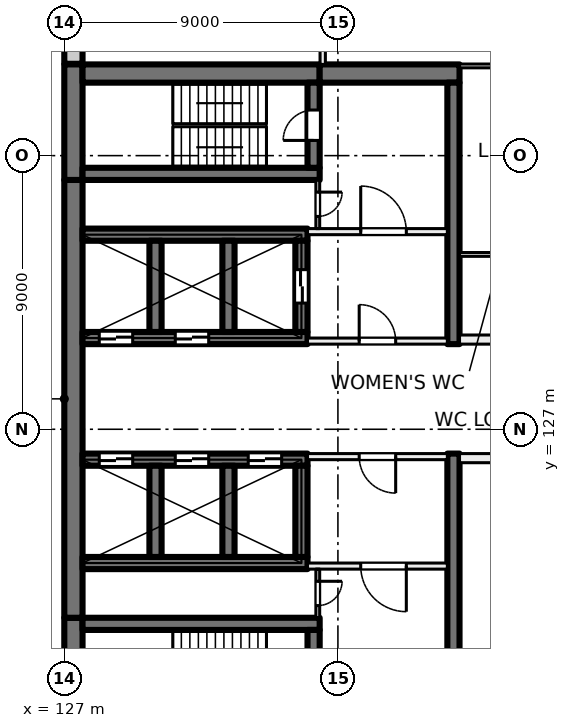
"""IFC4 building model, lengths in metres.
Left out: names, types, materials, properties, quantities, classifications, styles, units other than length and angle.
Written with IfcOpenShell. Run it as: python <this file> out.ifc"""

import sys

from ifc_helpers import new_model, si_unit, direction, frame, frame_2d, origin, place, context, subcontext, project, spatial, rectangle, extrude, element, fill, save


model = new_model("IFC4")
c1 = context("Model", 3, precision=1e-05, world=origin(), true_north=direction((0.0, 1.0)))
c2 = subcontext(c1, "Body", "Model", "MODEL_VIEW")
j1 = project(units=[si_unit("LENGTHUNIT", "METRE"), si_unit("PLANEANGLEUNIT", "RADIAN")], contexts=[c1])
p1 = place(None, origin())
s1 = spatial("IfcSite", under=j1, at=p1, CompositionType="ELEMENT")
p2 = place(p1, origin())
s2 = spatial("IfcBuilding", under=s1, at=p2, CompositionType="ELEMENT")
p3 = place(p2, frame((0.0, 0.0, 59.5)))
s3 = spatial("IfcBuildingStorey", under=s2, at=p3, CompositionType="ELEMENT", Elevation=59.5)
p4 = place(p3, frame((127.3, 117.0, 0.0), z_axis=(0.0, 0.0, 1.0), x_axis=(0.0, 1.0, 0.0)))
e1 = element("IfcWall", 1, at=p4, inside=s3, PredefinedType="SHEAR", context=c2, shape_type="SweptSolid", body=[
    extrude(rectangle(XDim=3.8, YDim=0.6, at=frame_2d((1.9, 0.0))), origin(), (0.0, 0.0, 1.0), 4.0),
])
p5 = place(p3, frame((127.3, 120.8, 0.0), z_axis=(0.0, 0.0, 1.0), x_axis=(0.0, 1.0, 0.0)))
e2 = element("IfcWall", 2, at=p5, inside=s3, PredefinedType="SHEAR", context=c2, shape_type="SweptSolid", body=[
    extrude(rectangle(XDim=14.4, YDim=0.6, at=frame_2d((7.2, 0.0))), origin(), (0.0, 0.0, 1.0), 4.0),
])
p6 = place(p3, frame((127.3, 135.2, 0.0), z_axis=(0.0, 0.0, 1.0), x_axis=(0.0, 1.0, 0.0)))
e3 = element("IfcWall", 3, at=p6, inside=s3, PredefinedType="SHEAR", context=c2, shape_type="SweptSolid", body=[
    extrude(rectangle(XDim=3.8, YDim=0.6, at=frame_2d((1.9, 0.0))), origin(), (0.0, 0.0, 1.0), 4.0),
])
p7 = place(p3, frame((127.6, 138.7, 0.0), z_axis=(0.0, 0.0, 1.0), x_axis=(1.0, 0.0, 0.0)))
e4 = element("IfcWall", 4, at=p7, inside=s3, PredefinedType="SHEAR", context=c2, shape_type="SweptSolid", body=[
    extrude(rectangle(XDim=7.8, YDim=0.6, at=frame_2d((3.9, 0.0))), origin(), (0.0, 0.0, 1.0), 4.0),
])
p8 = place(p3, frame((135.4, 138.7, 0.0), z_axis=(0.0, 0.0, 1.0), x_axis=(1.0, 0.0, 0.0)))
e5 = element("IfcWall", 5, at=p8, inside=s3, PredefinedType="SHEAR", context=c2, shape_type="SweptSolid", body=[
    extrude(rectangle(XDim=4.6, YDim=0.6, at=frame_2d((2.3, 0.0))), origin(), (0.0, 0.0, 1.0), 4.0),
])
p9 = place(p3, frame((127.6, 120.6, 0.0), z_axis=(0.0, 0.0, 1.0), x_axis=(1.0, 0.0, 0.0)))
e6 = element("IfcWall", 6, at=p9, inside=s3, PredefinedType="SHEAR", context=c2, shape_type="SweptSolid", body=[
    extrude(rectangle(XDim=7.8, YDim=0.4, at=frame_2d((3.9, 0.0))), origin(), (0.0, 0.0, 1.0), 4.0),
])
p10 = place(p3, frame((135.2, 117.6, 0.0), z_axis=(0.0, 0.0, 1.0), x_axis=(0.0, 1.0, 0.0)))
e7 = element("IfcWall", 7, at=p10, inside=s3, PredefinedType="SHEAR", context=c2, shape_type="SweptSolid", body=[
    extrude(rectangle(XDim=2.8, YDim=0.4, at=frame_2d((1.4, 0.0))), origin(), (0.0, 0.0, 1.0), 4.0),
])
p11 = place(p10, frame((0.9, 0.0, 0.0)))
e8 = element("IfcOpeningElement", 8, at=p11, cuts=e7, PredefinedType="OPENING", context=c2, shape_type="SweptSolid", body=[
    extrude(rectangle(XDim=1.0, YDim=2.1, at=frame_2d((0.5, 1.05))), frame((0.0, 0.21, 0.0), z_axis=(0.0, -1.0, 0.0), x_axis=(1.0, 0.0, 0.0)), (0.0, 0.0, 1.0), 0.42),
])
p12 = place(p3, frame((127.6, 135.4, 0.0), z_axis=(0.0, 0.0, 1.0), x_axis=(1.0, 0.0, 0.0)))
e9 = element("IfcWall", 9, at=p12, inside=s3, PredefinedType="SHEAR", context=c2, shape_type="SweptSolid", body=[
    extrude(rectangle(XDim=7.8, YDim=0.4, at=frame_2d((3.9, 0.0))), origin(), (0.0, 0.0, 1.0), 4.0),
])
p13 = place(p3, frame((135.2, 135.6, 0.0), z_axis=(0.0, 0.0, 1.0), x_axis=(0.0, 1.0, 0.0)))
e10 = element("IfcWall", 10, at=p13, inside=s3, PredefinedType="SHEAR", context=c2, shape_type="SweptSolid", body=[
    extrude(rectangle(XDim=2.8, YDim=0.4, at=frame_2d((1.4, 0.0))), origin(), (0.0, 0.0, 1.0), 4.0),
])
p14 = place(p13, frame((0.9, 0.0, 0.0)))
e11 = element("IfcOpeningElement", 11, at=p14, cuts=e10, PredefinedType="OPENING", context=c2, shape_type="SweptSolid", body=[
    extrude(rectangle(XDim=1.0, YDim=2.1, at=frame_2d((0.5, 1.05))), frame((0.0, 0.21, 0.0), z_axis=(0.0, -1.0, 0.0), x_axis=(1.0, 0.0, 0.0)), (0.0, 0.0, 1.0), 0.42),
])
p15 = place(p3, frame((127.6, 126.0, 0.0), z_axis=(0.0, 0.0, 1.0), x_axis=(1.0, 0.0, 0.0)))
e12 = element("IfcWall", 12, at=p15, inside=s3, PredefinedType="SHEAR", context=c2, shape_type="SweptSolid", body=[
    extrude(rectangle(XDim=7.4, YDim=0.4, at=frame_2d((3.7, 0.0))), origin(), (0.0, 0.0, 1.0), 4.0),
])
p16 = place(p15, frame((0.55, 0.0, 0.0)))
e13 = element("IfcOpeningElement", 13, at=p16, cuts=e12, PredefinedType="OPENING", context=c2, shape_type="SweptSolid", body=[
    extrude(rectangle(XDim=1.1, YDim=2.1, at=frame_2d((0.55, 1.05))), frame((0.0, 0.21, 0.0), z_axis=(0.0, -1.0, 0.0), x_axis=(1.0, 0.0, 0.0)), (0.0, 0.0, 1.0), 0.42),
])
p17 = place(p15, frame((3.05, 0.0, 0.0)))
e14 = element("IfcOpeningElement", 14, at=p17, cuts=e12, PredefinedType="OPENING", context=c2, shape_type="SweptSolid", body=[
    extrude(rectangle(XDim=1.1, YDim=2.1, at=frame_2d((0.55, 1.05))), frame((0.0, 0.21, 0.0), z_axis=(0.0, -1.0, 0.0), x_axis=(1.0, 0.0, 0.0)), (0.0, 0.0, 1.0), 0.42),
])
p18 = place(p15, frame((5.45, 0.0, 0.0)))
e15 = element("IfcOpeningElement", 15, at=p18, cuts=e12, PredefinedType="OPENING", context=c2, shape_type="SweptSolid", body=[
    extrude(rectangle(XDim=1.1, YDim=2.1, at=frame_2d((0.55, 1.05))), frame((0.0, 0.21, 0.0), z_axis=(0.0, -1.0, 0.0), x_axis=(1.0, 0.0, 0.0)), (0.0, 0.0, 1.0), 0.42),
])
p19 = place(p3, frame((127.6, 122.6, 0.0), z_axis=(0.0, 0.0, 1.0), x_axis=(1.0, 0.0, 0.0)))
e16 = element("IfcWall", 16, at=p19, inside=s3, PredefinedType="SHEAR", context=c2, shape_type="SweptSolid", body=[
    extrude(rectangle(XDim=7.4, YDim=0.4, at=frame_2d((3.7, 0.0))), origin(), (0.0, 0.0, 1.0), 4.0),
])
for number, where, z_axis, x_axis in (
    (17, (130.0, 122.8, 0.0), (0.0, 0.0, 1.0), (0.0, 1.0, 0.0)),
    (18, (132.4, 122.8, 0.0), (0.0, 0.0, 1.0), (0.0, 1.0, 0.0)),
    (19, (134.8, 122.8, 0.0), (0.0, 0.0, 1.0), (0.0, 1.0, 0.0)),
):
    element("IfcWall", number, at=place(p3, frame(where, z_axis=z_axis, x_axis=x_axis)), inside=s3, PredefinedType="SHEAR", context=c2, shape_type="SweptSolid", body=[
        extrude(rectangle(XDim=3.0, YDim=0.4, at=frame_2d((1.5, 0.0))), origin(), (0.0, 0.0, 1.0), 4.0),
    ])
p20 = place(p3, frame((127.6, 130.0, 0.0), z_axis=(0.0, 0.0, 1.0), x_axis=(1.0, 0.0, 0.0)))
e20 = element("IfcWall", 20, at=p20, inside=s3, PredefinedType="SHEAR", context=c2, shape_type="SweptSolid", body=[
    extrude(rectangle(XDim=7.4, YDim=0.4, at=frame_2d((3.7, 0.0))), origin(), (0.0, 0.0, 1.0), 4.0),
])
p21 = place(p20, frame((0.55, 0.0, 0.0)))
e21 = element("IfcOpeningElement", 21, at=p21, cuts=e20, PredefinedType="OPENING", context=c2, shape_type="SweptSolid", body=[
    extrude(rectangle(XDim=1.1, YDim=2.1, at=frame_2d((0.55, 1.05))), frame((0.0, 0.21, 0.0), z_axis=(0.0, -1.0, 0.0), x_axis=(1.0, 0.0, 0.0)), (0.0, 0.0, 1.0), 0.42),
])
p22 = place(p20, frame((3.05, 0.0, 0.0)))
e22 = element("IfcOpeningElement", 22, at=p22, cuts=e20, PredefinedType="OPENING", context=c2, shape_type="SweptSolid", body=[
    extrude(rectangle(XDim=1.1, YDim=2.1, at=frame_2d((0.55, 1.05))), frame((0.0, 0.21, 0.0), z_axis=(0.0, -1.0, 0.0), x_axis=(1.0, 0.0, 0.0)), (0.0, 0.0, 1.0), 0.42),
])
p23 = place(p3, frame((127.6, 133.4, 0.0), z_axis=(0.0, 0.0, 1.0), x_axis=(1.0, 0.0, 0.0)))
e23 = element("IfcWall", 23, at=p23, inside=s3, PredefinedType="SHEAR", context=c2, shape_type="SweptSolid", body=[
    extrude(rectangle(XDim=7.4, YDim=0.4, at=frame_2d((3.7, 0.0))), origin(), (0.0, 0.0, 1.0), 4.0),
])
for number, where, z_axis, x_axis in (
    (24, (130.0, 130.2, 0.0), (0.0, 0.0, 1.0), (0.0, 1.0, 0.0)),
    (25, (132.4, 130.2, 0.0), (0.0, 0.0, 1.0), (0.0, 1.0, 0.0)),
):
    element("IfcWall", number, at=place(p3, frame(where, z_axis=z_axis, x_axis=x_axis)), inside=s3, PredefinedType="SHEAR", context=c2, shape_type="SweptSolid", body=[
        extrude(rectangle(XDim=3.0, YDim=0.4, at=frame_2d((1.5, 0.0))), origin(), (0.0, 0.0, 1.0), 4.0),
    ])
p24 = place(p3, frame((134.8, 130.2, 0.0), z_axis=(0.0, 0.0, 1.0), x_axis=(0.0, 1.0, 0.0)))
e26 = element("IfcWall", 26, at=p24, inside=s3, PredefinedType="SHEAR", context=c2, shape_type="SweptSolid", body=[
    extrude(rectangle(XDim=3.0, YDim=0.4, at=frame_2d((1.5, 0.0))), origin(), (0.0, 0.0, 1.0), 4.0),
])
p25 = place(p24, frame((0.95, 0.0, 0.0)))
e27 = element("IfcOpeningElement", 27, at=p25, cuts=e26, PredefinedType="OPENING", context=c2, shape_type="SweptSolid", body=[
    extrude(rectangle(XDim=1.1, YDim=2.1, at=frame_2d((0.55, 1.05))), frame((0.0, 0.21, 0.0), z_axis=(0.0, -1.0, 0.0), x_axis=(1.0, 0.0, 0.0)), (0.0, 0.0, 1.0), 0.42),
])
for number, where, z_axis, x_axis in (
    (28, (139.8, 117.6, 0.0), (0.0, 0.0, 1.0), (0.0, 1.0, 0.0)),
    (29, (139.8, 129.8, 0.0), (0.0, 0.0, 1.0), (0.0, 1.0, 0.0)),
):
    element("IfcWall", number, at=place(p3, frame(where, z_axis=z_axis, x_axis=x_axis)), inside=s3, PredefinedType="SHEAR", context=c2, shape_type="SweptSolid", body=[
        extrude(rectangle(XDim=8.6, YDim=0.4, at=frame_2d((4.3, 0.0))), origin(), (0.0, 0.0, 1.0), 4.0),
    ])
p26 = place(p3, frame((127.3, 139.02, 0.0), z_axis=(0.0, 0.0, 1.0), x_axis=(0.0, 1.0, 0.0)))
e30 = element("IfcWall", 30, at=p26, inside=s3, PredefinedType="SOLIDWALL", context=c2, shape_type="SweptSolid", body=[
    extrude(rectangle(XDim=2.98, YDim=0.6, at=frame_2d((1.49, 0.0))), origin(), (0.0, 0.0, 1.0), 3.625),
])
p27 = place(p3, frame((135.0, 129.9, 0.0), z_axis=(0.0, 0.0, 1.0), x_axis=(1.0, 0.0, 0.0)))
e31 = element("IfcWall", 31, at=p27, inside=s3, PredefinedType="PARTITIONING", context=c2, shape_type="SweptSolid", body=[
    extrude(rectangle(XDim=4.6, YDim=0.2, at=frame_2d((2.3, 0.0))), origin(), (0.0, 0.0, 1.0), 3.625),
])
p28 = place(p27, frame((1.7, 0.0, 0.0)))
e32 = element("IfcOpeningElement", 32, at=p28, cuts=e31, PredefinedType="OPENING", context=c2, shape_type="SweptSolid", body=[
    extrude(rectangle(XDim=1.2, YDim=2.1, at=frame_2d((0.6, 1.05))), frame((0.0, 0.11, 0.0), z_axis=(0.0, -1.0, 0.0), x_axis=(1.0, 0.0, 0.0)), (0.0, 0.0, 1.0), 0.22),
])
p29 = place(p3, frame((135.0, 133.5, 0.0), z_axis=(0.0, 0.0, 1.0), x_axis=(1.0, 0.0, 0.0)))
e33 = element("IfcWall", 33, at=p29, inside=s3, PredefinedType="PARTITIONING", context=c2, shape_type="SweptSolid", body=[
    extrude(rectangle(XDim=4.6, YDim=0.2, at=frame_2d((2.3, 0.0))), origin(), (0.0, 0.0, 1.0), 3.625),
])
p30 = place(p29, frame((1.75, 0.0, 0.0)))
e34 = element("IfcOpeningElement", 34, at=p30, cuts=e33, PredefinedType="OPENING", context=c2, shape_type="SweptSolid", body=[
    extrude(rectangle(XDim=1.5, YDim=2.1, at=frame_2d((0.75, 1.05))), frame((0.0, 0.11, 0.0), z_axis=(0.0, -1.0, 0.0), x_axis=(1.0, 0.0, 0.0)), (0.0, 0.0, 1.0), 0.22),
])
p31 = place(p3, frame((135.337, 135.2, 0.0), z_axis=(0.0, 0.0, 1.0), x_axis=(0.0, -1.0, 0.0)))
e35 = element("IfcWall", 35, at=p31, inside=s3, PredefinedType="PARTITIONING", context=c2, shape_type="SweptSolid", body=[
    extrude(rectangle(XDim=1.6, YDim=0.125, at=frame_2d((0.8, 0.0))), origin(), (0.0, 0.0, 1.0), 3.625),
])
p32 = place(p31, frame((0.4, 0.0, 0.0)))
e36 = element("IfcOpeningElement", 36, at=p32, cuts=e35, PredefinedType="OPENING", context=c2, shape_type="SweptSolid", body=[
    extrude(rectangle(XDim=0.8, YDim=2.1, at=frame_2d((0.4, 1.05))), frame((0.0, 0.073, 0.0), z_axis=(0.0, -1.0, 0.0), x_axis=(1.0, 0.0, 0.0)), (0.0, 0.0, 1.0), 0.145),
])
p33 = place(p3, frame((139.6, 126.1, 0.0), z_axis=(0.0, 0.0, 1.0), x_axis=(-1.0, 0.0, 0.0)))
e37 = element("IfcWall", 37, at=p33, inside=s3, PredefinedType="PARTITIONING", context=c2, shape_type="SweptSolid", body=[
    extrude(rectangle(XDim=4.6, YDim=0.2, at=frame_2d((2.3, 0.0))), origin(), (0.0, 0.0, 1.0), 3.625),
])
p34 = place(p33, frame((1.7, 0.0, 0.0)))
e38 = element("IfcOpeningElement", 38, at=p34, cuts=e37, PredefinedType="OPENING", context=c2, shape_type="SweptSolid", body=[
    extrude(rectangle(XDim=1.2, YDim=2.1, at=frame_2d((0.6, 1.05))), frame((0.0, 0.11, 0.0), z_axis=(0.0, -1.0, 0.0), x_axis=(1.0, 0.0, 0.0)), (0.0, 0.0, 1.0), 0.22),
])
p35 = place(p3, frame((139.6, 122.5, 0.0), z_axis=(0.0, 0.0, 1.0), x_axis=(-1.0, 0.0, 0.0)))
e39 = element("IfcWall", 39, at=p35, inside=s3, PredefinedType="PARTITIONING", context=c2, shape_type="SweptSolid", body=[
    extrude(rectangle(XDim=4.6, YDim=0.2, at=frame_2d((2.3, 0.0))), origin(), (0.0, 0.0, 1.0), 3.625),
])
p36 = place(p35, frame((1.35, 0.0, 0.0)))
e40 = element("IfcOpeningElement", 40, at=p36, cuts=e39, PredefinedType="OPENING", context=c2, shape_type="SweptSolid", body=[
    extrude(rectangle(XDim=1.5, YDim=2.1, at=frame_2d((0.75, 1.05))), frame((0.0, 0.11, 0.0), z_axis=(0.0, -1.0, 0.0), x_axis=(1.0, 0.0, 0.0)), (0.0, 0.0, 1.0), 0.22),
])
p37 = place(p3, frame((135.337, 122.4, 0.0), z_axis=(0.0, 0.0, 1.0), x_axis=(0.0, -1.0, 0.0)))
e41 = element("IfcWall", 41, at=p37, inside=s3, PredefinedType="PARTITIONING", context=c2, shape_type="SweptSolid", body=[
    extrude(rectangle(XDim=1.6, YDim=0.125, at=frame_2d((0.8, 0.0))), origin(), (0.0, 0.0, 1.0), 3.625),
])
p38 = place(p37, frame((0.4, 0.0, 0.0)))
e42 = element("IfcOpeningElement", 42, at=p38, cuts=e41, PredefinedType="OPENING", context=c2, shape_type="SweptSolid", body=[
    extrude(rectangle(XDim=0.8, YDim=2.1, at=frame_2d((0.4, 1.05))), frame((0.0, 0.073, 0.0), z_axis=(0.0, -1.0, 0.0), x_axis=(1.0, 0.0, 0.0)), (0.0, 0.0, 1.0), 0.145),
])
p39 = place(p3, frame((135.5, 145.4, 0.0), z_axis=(0.0, 0.0, 1.0), x_axis=(0.0, -1.0, 0.0)))
e43 = element("IfcWall", 43, at=p39, inside=s3, PredefinedType="PARTITIONING", context=c2, shape_type="SweptSolid", body=[
    extrude(rectangle(XDim=6.4, YDim=0.175, at=frame_2d((3.2, 0.0))), origin(), (0.0, 0.0, 1.0), 3.625),
])
p40 = place(p39, frame((2.6, 0.0, 0.0)))
e44 = element("IfcOpeningElement", 44, at=p40, cuts=e43, PredefinedType="OPENING", context=c2, shape_type="SweptSolid", body=[
    extrude(rectangle(XDim=1.2, YDim=2.1, at=frame_2d((0.6, 1.05))), frame((0.0, 0.097, 0.0), z_axis=(0.0, -1.0, 0.0), x_axis=(1.0, 0.0, 0.0)), (0.0, 0.0, 1.0), 0.195),
])
p41 = place(p3, frame((140.0, 129.95, 0.0), z_axis=(0.0, 0.0, 1.0), x_axis=(1.0, 0.0, 0.0)))
e45 = element("IfcWall", 45, at=p41, inside=s3, PredefinedType="PARTITIONING", context=c2, shape_type="SweptSolid", body=[
    extrude(rectangle(XDim=14.0, YDim=0.3, at=frame_2d((7.0, 0.0))), origin(), (0.0, 0.0, 1.0), 3.625),
])
p42 = place(p41, frame((2.75, 0.0, 0.0)))
e46 = element("IfcOpeningElement", 46, at=p42, cuts=e45, PredefinedType="OPENING", context=c2, shape_type="SweptSolid", body=[
    extrude(rectangle(XDim=1.0, YDim=2.1, at=frame_2d((0.5, 1.05))), frame((0.0, 0.16, 0.0), z_axis=(0.0, -1.0, 0.0), x_axis=(1.0, 0.0, 0.0)), (0.0, 0.0, 1.0), 0.32),
])
p43 = place(p41, frame((10.6, 0.0, 0.0)))
e47 = element("IfcOpeningElement", 47, at=p43, cuts=e45, PredefinedType="OPENING", context=c2, shape_type="SweptSolid", body=[
    extrude(rectangle(XDim=1.8, YDim=2.1, at=frame_2d((0.9, 1.05))), frame((0.0, 0.16, 0.0), z_axis=(0.0, -1.0, 0.0), x_axis=(1.0, 0.0, 0.0)), (0.0, 0.0, 1.0), 0.32),
])
p44 = place(p3, frame((140.0, 132.75, 0.0), z_axis=(0.0, 0.0, 1.0), x_axis=(1.0, 0.0, 0.0)))
e48 = element("IfcWall", 48, at=p44, inside=s3, PredefinedType="PARTITIONING", context=c2, shape_type="SweptSolid", body=[
    extrude(rectangle(XDim=8.938, YDim=0.125, at=frame_2d((4.469, 0.0))), origin(), (0.0, 0.0, 1.0), 3.625),
])
p45 = place(p44, frame((1.85, 0.0, 0.0)))
e49 = element("IfcOpeningElement", 49, at=p45, cuts=e48, PredefinedType="OPENING", context=c2, shape_type="SweptSolid", body=[
    extrude(rectangle(XDim=0.8, YDim=2.1, at=frame_2d((0.4, 1.05))), frame((0.0, 0.073, 0.0), z_axis=(0.0, -1.0, 0.0), x_axis=(1.0, 0.0, 0.0)), (0.0, 0.0, 1.0), 0.145),
])
p46 = place(p44, frame((5.102, 0.0, 0.0)))
e50 = element("IfcOpeningElement", 50, at=p46, cuts=e48, PredefinedType="OPENING", context=c2, shape_type="SweptSolid", body=[
    extrude(rectangle(XDim=0.8, YDim=2.1, at=frame_2d((0.4, 1.05))), frame((0.0, 0.073, 0.0), z_axis=(0.0, -1.0, 0.0), x_axis=(1.0, 0.0, 0.0)), (0.0, 0.0, 1.0), 0.145),
])
p47 = place(p3, frame((140.0, 138.95, 0.0), z_axis=(0.0, 0.0, 1.0), x_axis=(1.0, 0.0, 0.0)))
e51 = element("IfcWall", 51, at=p47, inside=s3, PredefinedType="PARTITIONING", context=c2, shape_type="SweptSolid", body=[
    extrude(rectangle(XDim=8.938, YDim=0.125, at=frame_2d((4.469, 0.0))), origin(), (0.0, 0.0, 1.0), 3.625),
])
p48 = place(p3, frame((154.0, 126.05, 0.0), z_axis=(0.0, 0.0, 1.0), x_axis=(-1.0, 0.0, 0.0)))
e52 = element("IfcWall", 52, at=p48, inside=s3, PredefinedType="PARTITIONING", context=c2, shape_type="SweptSolid", body=[
    extrude(rectangle(XDim=14.0, YDim=0.3, at=frame_2d((7.0, 0.0))), origin(), (0.0, 0.0, 1.0), 3.625),
])
p49 = place(p48, frame((6.1, 0.0, 0.0)))
e53 = element("IfcOpeningElement", 53, at=p49, cuts=e52, PredefinedType="OPENING", context=c2, shape_type="SweptSolid", body=[
    extrude(rectangle(XDim=1.8, YDim=2.1, at=frame_2d((0.9, 1.05))), frame((0.0, 0.16, 0.0), z_axis=(0.0, -1.0, 0.0), x_axis=(1.0, 0.0, 0.0)), (0.0, 0.0, 1.0), 0.32),
])
p50 = place(p21, origin())
e54 = element("IfcDoor", 54, at=p50, inside=s3, OperationType="DOUBLE_DOOR_SLIDING", PredefinedType="DOOR", context=c2, shape_type="SweptSolid", body=[
    extrude(rectangle(XDim=1.1, YDim=2.1, at=frame_2d((0.55, 1.05))), frame((0.0, 0.025, 0.0), z_axis=(0.0, -1.0, 0.0), x_axis=(1.0, 0.0, 0.0)), (0.0, 0.0, 1.0), 0.05),
])
fill(e21, e54)
p51 = place(p22, origin())
e55 = element("IfcDoor", 55, at=p51, inside=s3, OperationType="DOUBLE_DOOR_SLIDING", PredefinedType="DOOR", context=c2, shape_type="SweptSolid", body=[
    extrude(rectangle(XDim=1.1, YDim=2.1, at=frame_2d((0.55, 1.05))), frame((0.0, 0.025, 0.0), z_axis=(0.0, -1.0, 0.0), x_axis=(1.0, 0.0, 0.0)), (0.0, 0.0, 1.0), 0.05),
])
fill(e22, e55)
p52 = place(p16, origin())
e56 = element("IfcDoor", 56, at=p52, inside=s3, OperationType="DOUBLE_DOOR_SLIDING", PredefinedType="DOOR", context=c2, shape_type="SweptSolid", body=[
    extrude(rectangle(XDim=1.1, YDim=2.1, at=frame_2d((0.55, 1.05))), frame((0.0, 0.025, 0.0), z_axis=(0.0, -1.0, 0.0), x_axis=(1.0, 0.0, 0.0)), (0.0, 0.0, 1.0), 0.05),
])
fill(e13, e56)
p53 = place(p17, origin())
e57 = element("IfcDoor", 57, at=p53, inside=s3, OperationType="DOUBLE_DOOR_SLIDING", PredefinedType="DOOR", context=c2, shape_type="SweptSolid", body=[
    extrude(rectangle(XDim=1.1, YDim=2.1, at=frame_2d((0.55, 1.05))), frame((0.0, 0.025, 0.0), z_axis=(0.0, -1.0, 0.0), x_axis=(1.0, 0.0, 0.0)), (0.0, 0.0, 1.0), 0.05),
])
fill(e14, e57)
p54 = place(p18, origin())
e58 = element("IfcDoor", 58, at=p54, inside=s3, OperationType="DOUBLE_DOOR_SLIDING", PredefinedType="DOOR", context=c2, shape_type="SweptSolid", body=[
    extrude(rectangle(XDim=1.1, YDim=2.1, at=frame_2d((0.55, 1.05))), frame((0.0, 0.025, 0.0), z_axis=(0.0, -1.0, 0.0), x_axis=(1.0, 0.0, 0.0)), (0.0, 0.0, 1.0), 0.05),
])
fill(e15, e58)
p55 = place(p28, origin())
e59 = element("IfcDoor", 59, at=p55, inside=s3, OperationType="DOUBLE_DOOR_SINGLE_SWING", PredefinedType="DOOR", context=c2, shape_type="SweptSolid", body=[
    extrude(rectangle(XDim=1.2, YDim=2.1, at=frame_2d((0.6, 1.05))), frame((0.0, 0.025, 0.0), z_axis=(0.0, -1.0, 0.0), x_axis=(1.0, 0.0, 0.0)), (0.0, 0.0, 1.0), 0.05),
])
fill(e32, e59)
p56 = place(p30, origin())
e60 = element("IfcDoor", 60, at=p56, inside=s3, OperationType="DOUBLE_DOOR_SINGLE_SWING", PredefinedType="DOOR", context=c2, shape_type="SweptSolid", body=[
    extrude(rectangle(XDim=1.5, YDim=2.1, at=frame_2d((0.75, 1.05))), frame((0.0, 0.025, 0.0), z_axis=(0.0, -1.0, 0.0), x_axis=(1.0, 0.0, 0.0)), (0.0, 0.0, 1.0), 0.05),
])
fill(e34, e60)
p57 = place(p14, origin())
e61 = element("IfcDoor", 61, at=p57, inside=s3, OperationType="SINGLE_SWING_LEFT", PredefinedType="DOOR", context=c2, shape_type="SweptSolid", body=[
    extrude(rectangle(XDim=1.0, YDim=2.1, at=frame_2d((0.5, 1.05))), frame((0.0, 0.025, 0.0), z_axis=(0.0, -1.0, 0.0), x_axis=(1.0, 0.0, 0.0)), (0.0, 0.0, 1.0), 0.05),
])
fill(e11, e61)
p58 = place(p32, origin())
e62 = element("IfcDoor", 62, at=p58, inside=s3, OperationType="SINGLE_SWING_RIGHT", PredefinedType="DOOR", context=c2, shape_type="SweptSolid", body=[
    extrude(rectangle(XDim=0.8, YDim=2.1, at=frame_2d((0.4, 1.05))), frame((0.0, 0.025, 0.0), z_axis=(0.0, -1.0, 0.0), x_axis=(1.0, 0.0, 0.0)), (0.0, 0.0, 1.0), 0.05),
])
fill(e36, e62)
p59 = place(p34, origin())
e63 = element("IfcDoor", 63, at=p59, inside=s3, OperationType="DOUBLE_DOOR_SINGLE_SWING", PredefinedType="DOOR", context=c2, shape_type="SweptSolid", body=[
    extrude(rectangle(XDim=1.2, YDim=2.1, at=frame_2d((0.6, 1.05))), frame((0.0, 0.025, 0.0), z_axis=(0.0, -1.0, 0.0), x_axis=(1.0, 0.0, 0.0)), (0.0, 0.0, 1.0), 0.05),
])
fill(e38, e63)
p60 = place(p36, origin())
e64 = element("IfcDoor", 64, at=p60, inside=s3, OperationType="DOUBLE_DOOR_SINGLE_SWING", PredefinedType="DOOR", context=c2, shape_type="SweptSolid", body=[
    extrude(rectangle(XDim=1.5, YDim=2.1, at=frame_2d((0.75, 1.05))), frame((0.0, 0.025, 0.0), z_axis=(0.0, -1.0, 0.0), x_axis=(1.0, 0.0, 0.0)), (0.0, 0.0, 1.0), 0.05),
])
fill(e40, e64)
p61 = place(p38, origin())
e65 = element("IfcDoor", 65, at=p61, inside=s3, OperationType="SINGLE_SWING_LEFT", PredefinedType="DOOR", context=c2, shape_type="SweptSolid", body=[
    extrude(rectangle(XDim=0.8, YDim=2.1, at=frame_2d((0.4, 1.05))), frame((0.0, 0.025, 0.0), z_axis=(0.0, -1.0, 0.0), x_axis=(1.0, 0.0, 0.0)), (0.0, 0.0, 1.0), 0.05),
])
fill(e42, e65)
p62 = place(p25, origin())
e66 = element("IfcDoor", 66, at=p62, inside=s3, OperationType="DOUBLE_DOOR_SLIDING", PredefinedType="DOOR", context=c2, shape_type="SweptSolid", body=[
    extrude(rectangle(XDim=1.1, YDim=2.1, at=frame_2d((0.55, 1.05))), frame((0.0, 0.025, 0.0), z_axis=(0.0, -1.0, 0.0), x_axis=(1.0, 0.0, 0.0)), (0.0, 0.0, 1.0), 0.05),
])
fill(e27, e66)
save(model, sys.argv[1])
